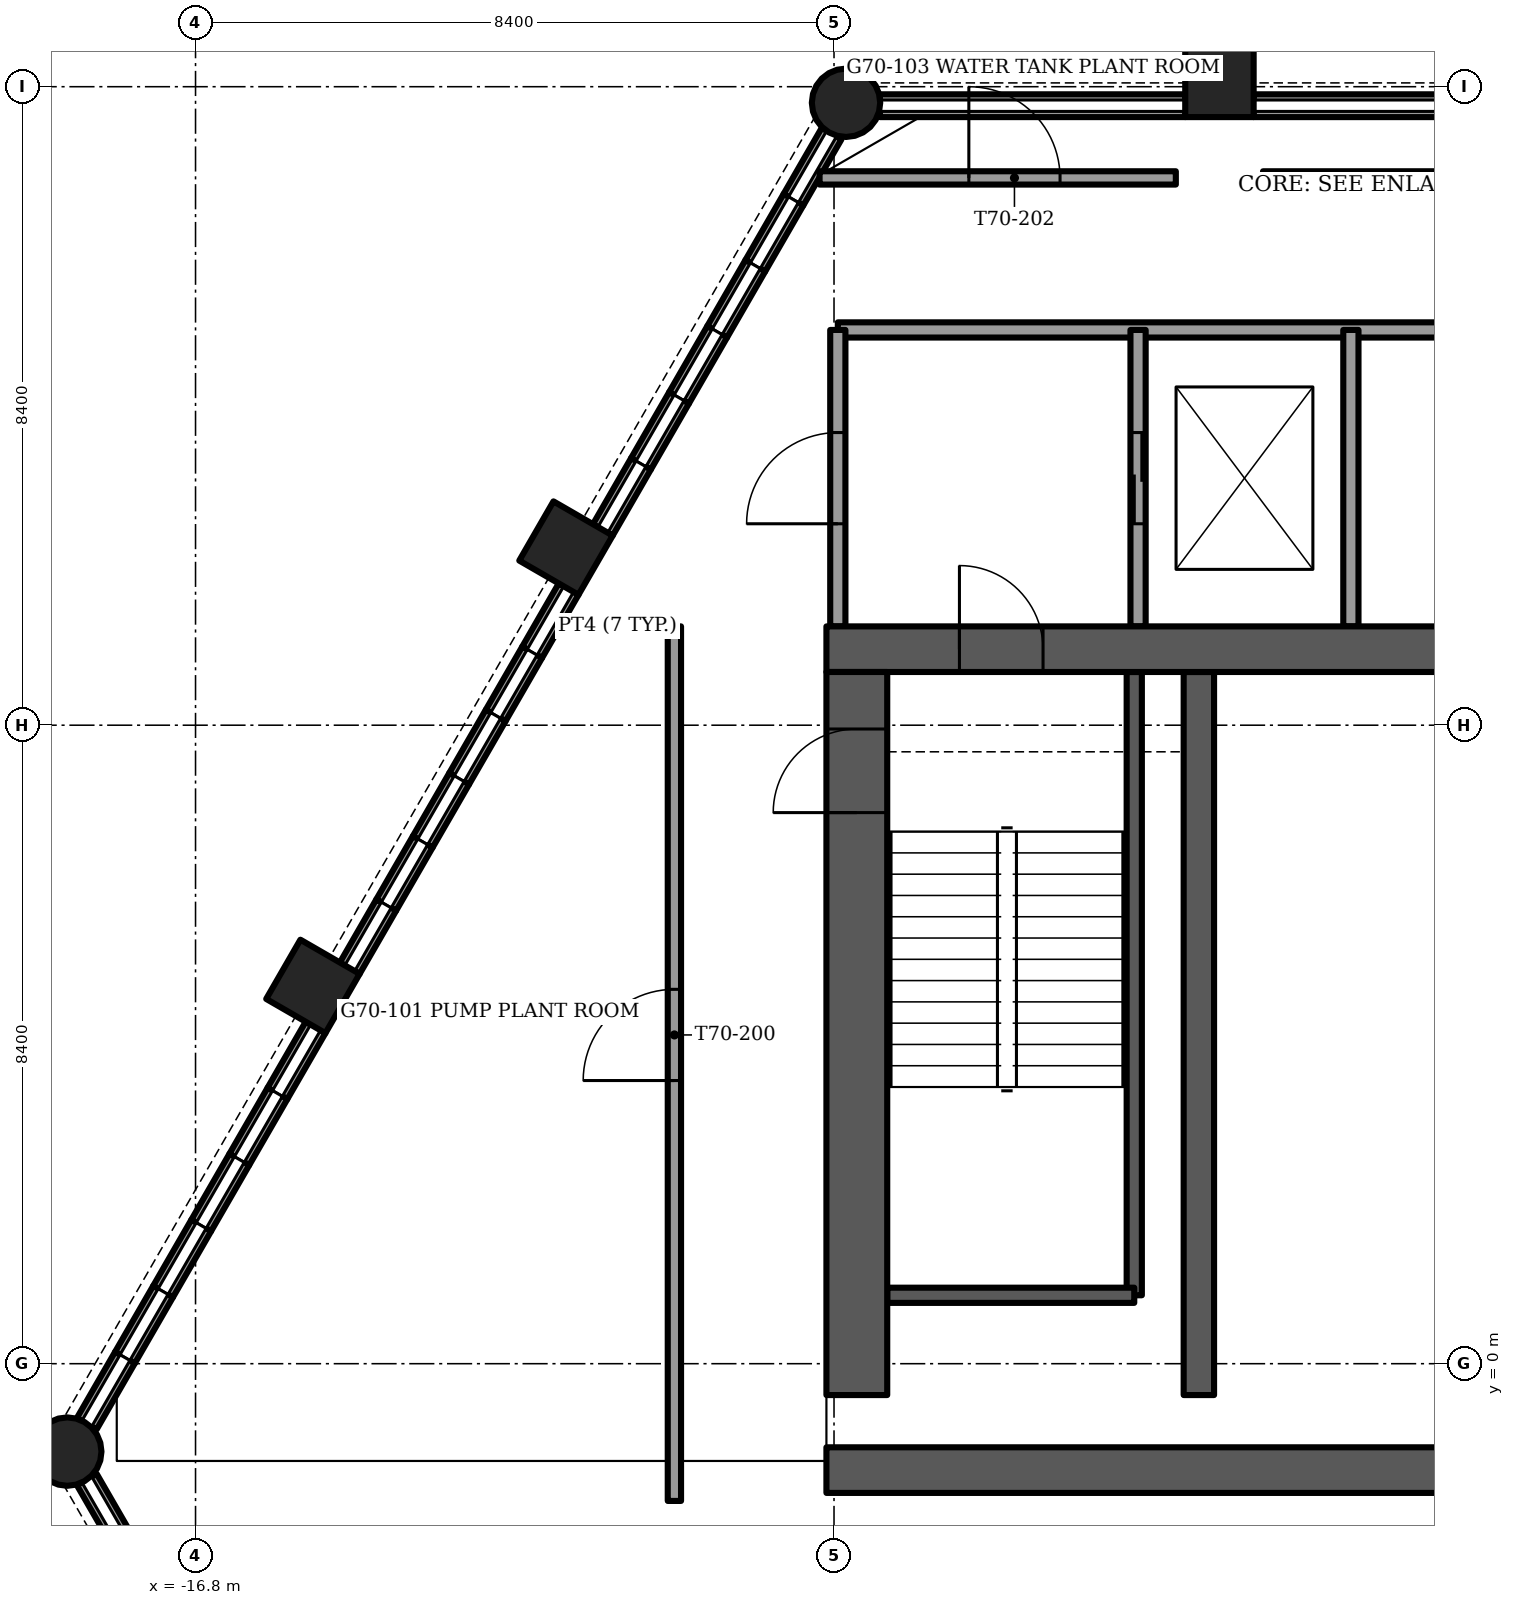
"""IFC4 building model, lengths in metres.
Left out: names, types, materials, properties, quantities, classifications, styles, units other than length and angle.
Written with IfcOpenShell. Run it as: python <this file> out.ifc"""

import sys

from ifc_helpers import new_model, si_unit, direction, frame, frame_2d, origin, origin_2d, place, context, subcontext, project, spatial, rectangle, circle, extrude, element, fill, save


model = new_model("IFC4")
c1 = context("Model", 3, precision=1e-05, world=origin(), true_north=direction((0.0, 1.0)))
c2 = subcontext(c1, "Body", "Model", "MODEL_VIEW")
j1 = project(units=[si_unit("LENGTHUNIT", "METRE"), si_unit("PLANEANGLEUNIT", "RADIAN")], contexts=[c1])
p1 = place(None, origin())
s1 = spatial("IfcSite", under=j1, at=p1, CompositionType="ELEMENT")
p2 = place(p1, origin())
s2 = spatial("IfcBuilding", under=s1, at=p2, CompositionType="ELEMENT")
p3 = place(p2, frame((0.0, 0.0, 284.0)))
s3 = spatial("IfcBuildingStorey", under=s2, at=p3, CompositionType="ELEMENT", Elevation=284.0)
p4 = place(p3, frame((-8.5, -1.4, -0.3), z_axis=(0.0, 0.0, 1.0), x_axis=(1.0, 0.0, 0.0)))
e1 = element("IfcWall", 1, at=p4, inside=s3, PredefinedType="SHEAR", context=c2, shape_type="SweptSolid", body=[
    extrude(rectangle(XDim=17.0, YDim=0.6, at=frame_2d((8.5, 0.0))), origin(), (0.0, 0.0, 1.0), 3.57),
])
p5 = place(p3, frame((-8.5, 9.4, -0.3), z_axis=(0.0, 0.0, 1.0), x_axis=(1.0, 0.0, 0.0)))
e2 = element("IfcWall", 2, at=p5, inside=s3, PredefinedType="SHEAR", context=c2, shape_type="SweptSolid", body=[
    extrude(rectangle(XDim=17.0, YDim=0.6, at=frame_2d((8.5, 0.0))), origin(), (0.0, 0.0, 1.0), 4.5),
])
p6 = place(p5, frame((1.75, 0.0, 0.0)))
e3 = element("IfcOpeningElement", 3, at=p6, cuts=e2, PredefinedType="OPENING", context=c2, shape_type="SweptSolid", body=[
    extrude(rectangle(XDim=1.1, YDim=2.1, at=frame_2d((0.55, 1.05))), frame((0.0, 0.3, 0.0), z_axis=(0.0, -1.0, 0.0), x_axis=(1.0, 0.0, 0.0)), (0.0, 0.0, 1.0), 0.6),
])
p7 = place(p5, frame((14.15, 0.0, 0.0)))
e4 = element("IfcOpeningElement", 4, at=p7, cuts=e2, PredefinedType="OPENING", context=c2, shape_type="SweptSolid", body=[
    extrude(rectangle(XDim=1.1, YDim=2.1, at=frame_2d((0.55, 1.05))), frame((0.0, 0.3, 0.0), z_axis=(0.0, -1.0, 0.0), x_axis=(1.0, 0.0, 0.0)), (0.0, 0.0, 1.0), 0.6),
])
p8 = place(p3, frame((-8.1, -0.413, -0.3), z_axis=(0.0, 0.0, 1.0), x_axis=(0.0, 1.0, 0.0)))
e5 = element("IfcWall", 5, at=p8, inside=s3, PredefinedType="SHEAR", context=c2, shape_type="SweptSolid", body=[
    extrude(rectangle(XDim=9.513, YDim=0.8, at=frame_2d((4.756, 0.0))), origin(), (0.0, 0.0, 1.0), 4.5),
])
p9 = place(p8, frame((7.663, 0.0, 0.0)))
e6 = element("IfcOpeningElement", 6, at=p9, cuts=e5, PredefinedType="OPENING", context=c2, shape_type="SweptSolid", body=[
    extrude(rectangle(XDim=1.1, YDim=2.1, at=frame_2d((0.55, 1.05))), frame((0.0, 0.4, 0.0), z_axis=(0.0, -1.0, 0.0), x_axis=(1.0, 0.0, 0.0)), (0.0, 0.0, 1.0), 0.8),
])
p10 = place(p3, frame((-3.6, -0.413, -0.3), z_axis=(0.0, 0.0, 1.0), x_axis=(0.0, 1.0, 0.0)))
e7 = element("IfcWall", 7, at=p10, inside=s3, PredefinedType="SHEAR", context=c2, shape_type="SweptSolid", body=[
    extrude(rectangle(XDim=9.513, YDim=0.4, at=frame_2d((4.756, 0.0))), origin(), (0.0, 0.0, 1.0), 4.5),
])
for number, where, z_axis, x_axis in (
    (8, (-8.242, 16.589, -1.2), (0.0, 0.0, 1.0), (1.0, 0.0, 0.0)),
    (9, (-18.487, -1.156, -1.2), (0.0, 0.0, 1.0), (1.0, 0.0, 0.0)),
):
    element("IfcColumn", number, at=place(p3, frame(where, z_axis=z_axis, x_axis=x_axis)), inside=s3, PredefinedType="COLUMN", context=c2, shape_type="SweptSolid", body=[
        extrude(circle(Radius=0.45, at=origin_2d()), origin(), (0.0, 0.0, 1.0), 4.5),
    ])
for number, where, z_axis, x_axis in (
    (10, (-3.329, 16.85, -1.2), (0.0, 0.0, 1.0), (1.0, 0.0, 0.0)),
    (11, (-11.926, 10.73, -1.2), (0.0, 0.0, 1.0), (0.5, 0.866, 0.0)),
    (12, (-15.256, 4.963, -1.2), (0.0, 0.0, 1.0), (0.5, 0.866, 0.0)),
):
    element("IfcColumn", number, at=place(p3, frame(where, z_axis=z_axis, x_axis=x_axis)), inside=s3, PredefinedType="COLUMN", context=c2, shape_type="SweptSolid", body=[
        extrude(rectangle(XDim=0.9, YDim=0.9, at=origin_2d()), origin(), (0.0, 0.0, 1.0), 4.5),
    ])
p11 = place(p3, frame((2.879, 16.55, 0.0), z_axis=(0.0, 0.0, 1.0), x_axis=(-1.0, 0.0, 0.0)))
e13 = element("IfcWall", 13, at=p11, inside=s3, PredefinedType="SOLIDWALL", context=c2, shape_type="SweptSolid", body=[
    extrude(rectangle(XDim=5.759, YDim=0.3, at=frame_2d((2.879, 0.0))), origin(), (0.0, 0.0, 1.0), 1.0),
])
p12 = place(p3, frame((-3.779, 16.55, 0.0), z_axis=(0.0, 0.0, 1.0), x_axis=(-1.0, 0.0, 0.0)))
e14 = element("IfcWall", 14, at=p12, inside=s3, PredefinedType="SOLIDWALL", context=c2, shape_type="SweptSolid", body=[
    extrude(rectangle(XDim=4.017, YDim=0.3, at=frame_2d((2.008, 0.0))), origin(), (0.0, 0.0, 1.0), 1.0),
])
p13 = place(p3, frame((-8.432, 16.182, 0.0), z_axis=(0.0, 0.0, 1.0), x_axis=(-0.500143783026, -0.865942374699, 0.0)))
e15 = element("IfcWall", 15, at=p13, inside=s3, PredefinedType="SOLIDWALL", context=c2, shape_type="SweptSolid", body=[
    extrude(rectangle(XDim=1.003, YDim=0.3, at=frame_2d((0.501, 0.0))), origin(), (0.0, 0.0, 1.0), 1.0),
])
p14 = place(p3, frame((-8.934, 15.314, 0.0), z_axis=(0.0, 0.0, 1.0), x_axis=(-0.500038395149, -0.8660032352, 0.0)))
e16 = element("IfcWall", 16, at=p14, inside=s3, PredefinedType="SOLIDWALL", context=c2, shape_type="SweptSolid", body=[
    extrude(rectangle(XDim=1.003, YDim=0.3, at=frame_2d((0.502, 0.0))), origin(), (0.0, 0.0, 1.0), 1.0),
])
p15 = place(p3, frame((-9.435, 14.445, 0.0), z_axis=(0.0, 0.0, 1.0), x_axis=(-0.499961250474, -0.866047774678, 0.0)))
e17 = element("IfcWall", 17, at=p15, inside=s3, PredefinedType="SOLIDWALL", context=c2, shape_type="SweptSolid", body=[
    extrude(rectangle(XDim=1.003, YDim=0.3, at=frame_2d((0.501, 0.0))), origin(), (0.0, 0.0, 1.0), 1.0),
])
for number, where, z_axis, x_axis in (
    (18, (-9.937, 13.576, 0.0), (0.0, 0.0, 1.0), (-0.5, -0.866, 0.0)),
    (19, (-10.438, 12.707, 0.0), (0.0, 0.0, 1.0), (-0.5, -0.866, 0.0)),
    (20, (-10.94, 11.839, 0.0), (0.0, 0.0, 1.0), (-0.5, -0.866, 0.0)),
):
    element("IfcWall", number, at=place(p3, frame(where, z_axis=z_axis, x_axis=x_axis)), inside=s3, PredefinedType="SOLIDWALL", context=c2, shape_type="SweptSolid", body=[
        extrude(rectangle(XDim=1.003, YDim=0.3, at=frame_2d((0.501, 0.0))), origin(), (0.0, 0.0, 1.0), 1.0),
    ])
for number, where, z_axis, x_axis in (
    (21, (-11.892, 10.19, 0.0), (0.0, 0.0, 1.0), (-0.5, -0.866, 0.0)),
    (22, (-12.371, 9.359, 0.0), (0.0, 0.0, 1.0), (-0.5, -0.866, 0.0)),
):
    element("IfcWall", number, at=place(p3, frame(where, z_axis=z_axis, x_axis=x_axis)), inside=s3, PredefinedType="SOLIDWALL", context=c2, shape_type="SweptSolid", body=[
        extrude(rectangle(XDim=0.96, YDim=0.3, at=frame_2d((0.48, 0.0))), origin(), (0.0, 0.0, 1.0), 1.0),
    ])
p16 = place(p3, frame((-12.851, 8.528, 0.0), z_axis=(0.0, 0.0, 1.0), x_axis=(-0.500023335103, -0.866011930837, 0.0)))
e23 = element("IfcWall", 23, at=p16, inside=s3, PredefinedType="SOLIDWALL", context=c2, shape_type="SweptSolid", body=[
    extrude(rectangle(XDim=0.96, YDim=0.3, at=frame_2d((0.48, 0.0))), origin(), (0.0, 0.0, 1.0), 1.0),
])
p17 = place(p3, frame((-13.331, 7.697, 0.0), z_axis=(0.0, 0.0, 1.0), x_axis=(-0.499832553123, -0.866122057702, 0.0)))
e24 = element("IfcWall", 24, at=p17, inside=s3, PredefinedType="SOLIDWALL", context=c2, shape_type="SweptSolid", body=[
    extrude(rectangle(XDim=0.96, YDim=0.3, at=frame_2d((0.48, 0.0))), origin(), (0.0, 0.0, 1.0), 1.0),
])
p18 = place(p3, frame((-13.811, 6.865, 0.0), z_axis=(0.0, 0.0, 1.0), x_axis=(-0.500023335103, -0.866011930837, 0.0)))
e25 = element("IfcWall", 25, at=p18, inside=s3, PredefinedType="SOLIDWALL", context=c2, shape_type="SweptSolid", body=[
    extrude(rectangle(XDim=0.96, YDim=0.3, at=frame_2d((0.48, 0.0))), origin(), (0.0, 0.0, 1.0), 1.0),
])
p19 = place(p3, frame((-14.291, 6.034, 0.0), z_axis=(0.0, 0.0, 1.0), x_axis=(-0.500133489192, -0.865948320045, 0.0)))
e26 = element("IfcWall", 26, at=p19, inside=s3, PredefinedType="SOLIDWALL", context=c2, shape_type="SweptSolid", body=[
    extrude(rectangle(XDim=0.96, YDim=0.3, at=frame_2d((0.48, 0.0))), origin(), (0.0, 0.0, 1.0), 1.0),
])
p20 = place(p3, frame((-15.221, 4.424, 0.0), z_axis=(0.0, 0.0, 1.0), x_axis=(-0.499961250474, -0.866047774678, 0.0)))
e27 = element("IfcWall", 27, at=p20, inside=s3, PredefinedType="SOLIDWALL", context=c2, shape_type="SweptSolid", body=[
    extrude(rectangle(XDim=1.003, YDim=0.3, at=frame_2d((0.501, 0.0))), origin(), (0.0, 0.0, 1.0), 1.0),
])
p21 = place(p3, frame((-15.722, 3.555, 0.0), z_axis=(0.0, 0.0, 1.0), x_axis=(-0.500143783026, -0.865942374699, 0.0)))
e28 = element("IfcWall", 28, at=p21, inside=s3, PredefinedType="SOLIDWALL", context=c2, shape_type="SweptSolid", body=[
    extrude(rectangle(XDim=1.003, YDim=0.3, at=frame_2d((0.501, 0.0))), origin(), (0.0, 0.0, 1.0), 1.0),
])
for number, where, z_axis, x_axis in (
    (29, (-16.224, 2.686, 0.0), (0.0, 0.0, 1.0), (-0.5, -0.866, 0.0)),
    (30, (-16.726, 1.818, 0.0), (0.0, 0.0, 1.0), (-0.5, -0.866, 0.0)),
    (31, (-17.227, 0.949, 0.0), (0.0, 0.0, 1.0), (-0.5, -0.866, 0.0)),
    (32, (-17.729, 0.08, 0.0), (0.0, 0.0, 1.0), (-0.5, -0.866, 0.0)),
):
    element("IfcWall", number, at=place(p3, frame(where, z_axis=z_axis, x_axis=x_axis)), inside=s3, PredefinedType="SOLIDWALL", context=c2, shape_type="SweptSolid", body=[
        extrude(rectangle(XDim=1.003, YDim=0.3, at=frame_2d((0.501, 0.0))), origin(), (0.0, 0.0, 1.0), 1.0),
    ])
p22 = place(p3, frame((-18.23, -1.525, 0.0), z_axis=(0.0, 0.0, 1.0), x_axis=(0.500010157896, -0.866019539041, 0.0)))
e33 = element("IfcWall", 33, at=p22, inside=s3, PredefinedType="SOLIDWALL", context=c2, shape_type="SweptSolid", body=[
    extrude(rectangle(XDim=1.004, YDim=0.3, at=frame_2d((0.502, 0.0))), origin(), (0.0, 0.0, 1.0), 1.0),
])
p23 = place(p3, frame((-11.996, 9.7, 0.0), z_axis=(0.0, 0.0, 1.0), x_axis=(1.0, 0.0, 0.0)))
e34 = element("IfcWall", 34, at=p23, inside=s3, PredefinedType="PARTITIONING", context=c2, shape_type="SweptSolid", body=[
    extrude(rectangle(XDim=1.496, YDim=0.175, at=frame_2d((0.748, 0.0))), origin(), (0.0, 0.0, 1.0), 4.2),
])
p24 = place(p3, frame((-8.59, 15.6, 0.0), z_axis=(0.0, 0.0, 1.0), x_axis=(1.0, 0.0, 0.0)))
e35 = element("IfcWall", 35, at=p24, inside=s3, PredefinedType="PARTITIONING", context=c2, shape_type="SweptSolid", body=[
    extrude(rectangle(XDim=4.687, YDim=0.175, at=frame_2d((2.344, 0.0))), origin(), (0.0, 0.0, 1.0), 4.2),
])
p25 = place(p24, frame((1.964, 0.0, 0.0)))
e36 = element("IfcOpeningElement", 36, at=p25, cuts=e35, PredefinedType="OPENING", context=c2, shape_type="SweptSolid", body=[
    extrude(rectangle(XDim=1.2, YDim=2.1, at=frame_2d((0.6, 1.05))), frame((0.0, 0.087, 0.0), z_axis=(0.0, -1.0, 0.0), x_axis=(1.0, 0.0, 0.0)), (0.0, 0.0, 1.0), 0.175),
])
p26 = place(p3, frame((-2.756, 15.6, 0.0), z_axis=(0.0, 0.0, 1.0), x_axis=(1.0, 0.0, 0.0)))
e37 = element("IfcWall", 37, at=p26, inside=s3, PredefinedType="PARTITIONING", context=c2, shape_type="SweptSolid", body=[
    extrude(rectangle(XDim=5.512, YDim=0.175, at=frame_2d((2.756, 0.0))), origin(), (0.0, 0.0, 1.0), 4.2),
])
p27 = place(p3, frame((-10.5, -1.806, 0.0), z_axis=(0.0, 0.0, 1.0), x_axis=(0.0, 1.0, 0.0)))
e38 = element("IfcWall", 38, at=p27, inside=s3, PredefinedType="PARTITIONING", context=c2, shape_type="SweptSolid", body=[
    extrude(rectangle(XDim=11.506, YDim=0.175, at=frame_2d((5.753, 0.0))), origin(), (0.0, 0.0, 1.0), 4.155),
])
p28 = place(p27, frame((5.531, 0.0, 0.0)))
e39 = element("IfcOpeningElement", 39, at=p28, cuts=e38, PredefinedType="OPENING", context=c2, shape_type="SweptSolid", body=[
    extrude(rectangle(XDim=1.2, YDim=2.1, at=frame_2d((0.6, 1.05))), frame((0.0, 0.087, 0.0), z_axis=(0.0, -1.0, 0.0), x_axis=(1.0, 0.0, 0.0)), (0.0, 0.0, 1.0), 0.175),
])
p29 = place(p3, frame((-4.45, 0.9, -0.3), z_axis=(0.0, 0.0, 1.0), x_axis=(0.0, 1.0, 0.0)))
e40 = element("IfcWall", 40, at=p29, inside=s3, PredefinedType="SOLIDWALL", context=c2, shape_type="SweptSolid", body=[
    extrude(rectangle(XDim=8.2, YDim=0.2, at=frame_2d((4.1, 0.0))), origin(), (0.0, 0.0, 1.0), 4.5),
])
p30 = place(p3, frame((-7.7, 0.9, -0.3), z_axis=(0.0, 0.0, 1.0), x_axis=(1.0, 0.0, 0.0)))
e41 = element("IfcWall", 41, at=p30, inside=s3, PredefinedType="SOLIDWALL", context=c2, shape_type="SweptSolid", body=[
    extrude(rectangle(XDim=3.25, YDim=0.2, at=frame_2d((1.625, 0.0))), origin(), (0.0, 0.0, 1.0), 4.5),
])
p31 = place(p3, frame((-8.35, 13.6, 0.0), z_axis=(0.0, 0.0, 1.0), x_axis=(1.0, 0.0, 0.0)))
e42 = element("IfcWall", 42, at=p31, inside=s3, PredefinedType="PARTITIONING", context=c2, shape_type="SweptSolid", body=[
    extrude(rectangle(XDim=16.7, YDim=0.2, at=frame_2d((8.35, 0.0))), origin(), (0.0, 0.0, 1.0), 4.2),
])
p32 = place(p3, frame((-8.35, 9.7, 0.0), z_axis=(0.0, 0.0, 1.0), x_axis=(0.0, 1.0, 0.0)))
e43 = element("IfcWall", 43, at=p32, inside=s3, PredefinedType="PARTITIONING", context=c2, shape_type="SweptSolid", body=[
    extrude(rectangle(XDim=3.9, YDim=0.2, at=frame_2d((1.95, 0.0))), origin(), (0.0, 0.0, 1.0), 4.2),
])
p33 = place(p32, frame((1.35, 0.0, 0.0)))
e44 = element("IfcOpeningElement", 44, at=p33, cuts=e43, PredefinedType="OPENING", context=c2, shape_type="SweptSolid", body=[
    extrude(rectangle(XDim=1.2, YDim=2.1, at=frame_2d((0.6, 1.05))), frame((0.0, 0.1, 0.0), z_axis=(0.0, -1.0, 0.0), x_axis=(1.0, 0.0, 0.0)), (0.0, 0.0, 1.0), 0.2),
])
p34 = place(p3, frame((-4.4, 9.7, 0.0), z_axis=(0.0, 0.0, 1.0), x_axis=(0.0, 1.0, 0.0)))
e45 = element("IfcWall", 45, at=p34, inside=s3, PredefinedType="PARTITIONING", context=c2, shape_type="SweptSolid", body=[
    extrude(rectangle(XDim=3.9, YDim=0.2, at=frame_2d((1.95, 0.0))), origin(), (0.0, 0.0, 1.0), 4.2),
])
p35 = place(p34, frame((1.35, 0.0, 0.0)))
e46 = element("IfcOpeningElement", 46, at=p35, cuts=e45, PredefinedType="OPENING", context=c2, shape_type="SweptSolid", body=[
    extrude(rectangle(XDim=1.2, YDim=2.1, at=frame_2d((0.6, 1.05))), frame((0.0, 0.1, 0.0), z_axis=(0.0, -1.0, 0.0), x_axis=(1.0, 0.0, 0.0)), (0.0, 0.0, 1.0), 0.2),
])
p36 = place(p3, frame((-1.6, 9.7, 0.0), z_axis=(0.0, 0.0, 1.0), x_axis=(0.0, 1.0, 0.0)))
e47 = element("IfcWall", 47, at=p36, inside=s3, PredefinedType="PARTITIONING", context=c2, shape_type="SweptSolid", body=[
    extrude(rectangle(XDim=3.9, YDim=0.2, at=frame_2d((1.95, 0.0))), origin(), (0.0, 0.0, 1.0), 4.2),
])
p37 = place(p28, origin())
e48 = element("IfcDoor", 48, at=p37, inside=s3, OperationType="SINGLE_SWING_RIGHT", PredefinedType="DOOR", context=c2, shape_type="SweptSolid", body=[
    extrude(rectangle(XDim=1.2, YDim=2.1, at=frame_2d((0.6, 1.05))), frame((0.0, 0.025, 0.0), z_axis=(0.0, -1.0, 0.0), x_axis=(1.0, 0.0, 0.0)), (0.0, 0.0, 1.0), 0.05),
])
fill(e39, e48)
p38 = place(p25, origin())
e49 = element("IfcDoor", 49, at=p38, inside=s3, OperationType="SINGLE_SWING_RIGHT", PredefinedType="DOOR", context=c2, shape_type="SweptSolid", body=[
    extrude(rectangle(XDim=1.2, YDim=2.1, at=frame_2d((0.6, 1.05))), frame((0.0, 0.025, 0.0), z_axis=(0.0, -1.0, 0.0), x_axis=(1.0, 0.0, 0.0)), (0.0, 0.0, 1.0), 0.05),
])
fill(e36, e49)
p39 = place(p6, origin())
e50 = element("IfcDoor", 50, at=p39, inside=s3, OperationType="SINGLE_SWING_LEFT", PredefinedType="DOOR", context=c2, shape_type="SweptSolid", body=[
    extrude(rectangle(XDim=1.1, YDim=2.1, at=frame_2d((0.55, 1.05))), frame((0.0, 0.025, 0.0), z_axis=(0.0, -1.0, 0.0), x_axis=(1.0, 0.0, 0.0)), (0.0, 0.0, 1.0), 0.05),
])
fill(e3, e50)
p40 = place(p9, origin())
e51 = element("IfcDoor", 51, at=p40, inside=s3, OperationType="SINGLE_SWING_RIGHT", PredefinedType="DOOR", context=c2, shape_type="SweptSolid", body=[
    extrude(rectangle(XDim=1.1, YDim=2.1, at=frame_2d((0.55, 1.05))), frame((0.0, 0.025, 0.0), z_axis=(0.0, -1.0, 0.0), x_axis=(1.0, 0.0, 0.0)), (0.0, 0.0, 1.0), 0.05),
])
fill(e6, e51)
p41 = place(p35, origin())
e52 = element("IfcDoor", 52, at=p41, inside=s3, OperationType="SLIDING_TO_LEFT", PredefinedType="DOOR", context=c2, shape_type="SweptSolid", body=[
    extrude(rectangle(XDim=1.2, YDim=2.1, at=frame_2d((0.6, 1.05))), frame((0.0, 0.025, 0.0), z_axis=(0.0, -1.0, 0.0), x_axis=(1.0, 0.0, 0.0)), (0.0, 0.0, 1.0), 0.05),
])
fill(e46, e52)
p42 = place(p33, origin())
e53 = element("IfcDoor", 53, at=p42, inside=s3, OperationType="SINGLE_SWING_LEFT", PredefinedType="DOOR", context=c2, shape_type="SweptSolid", body=[
    extrude(rectangle(XDim=1.2, YDim=2.1, at=frame_2d((0.6, 1.05))), frame((0.0, 0.025, 0.0), z_axis=(0.0, -1.0, 0.0), x_axis=(1.0, 0.0, 0.0)), (0.0, 0.0, 1.0), 0.05),
])
fill(e44, e53)
save(model, sys.argv[1])
